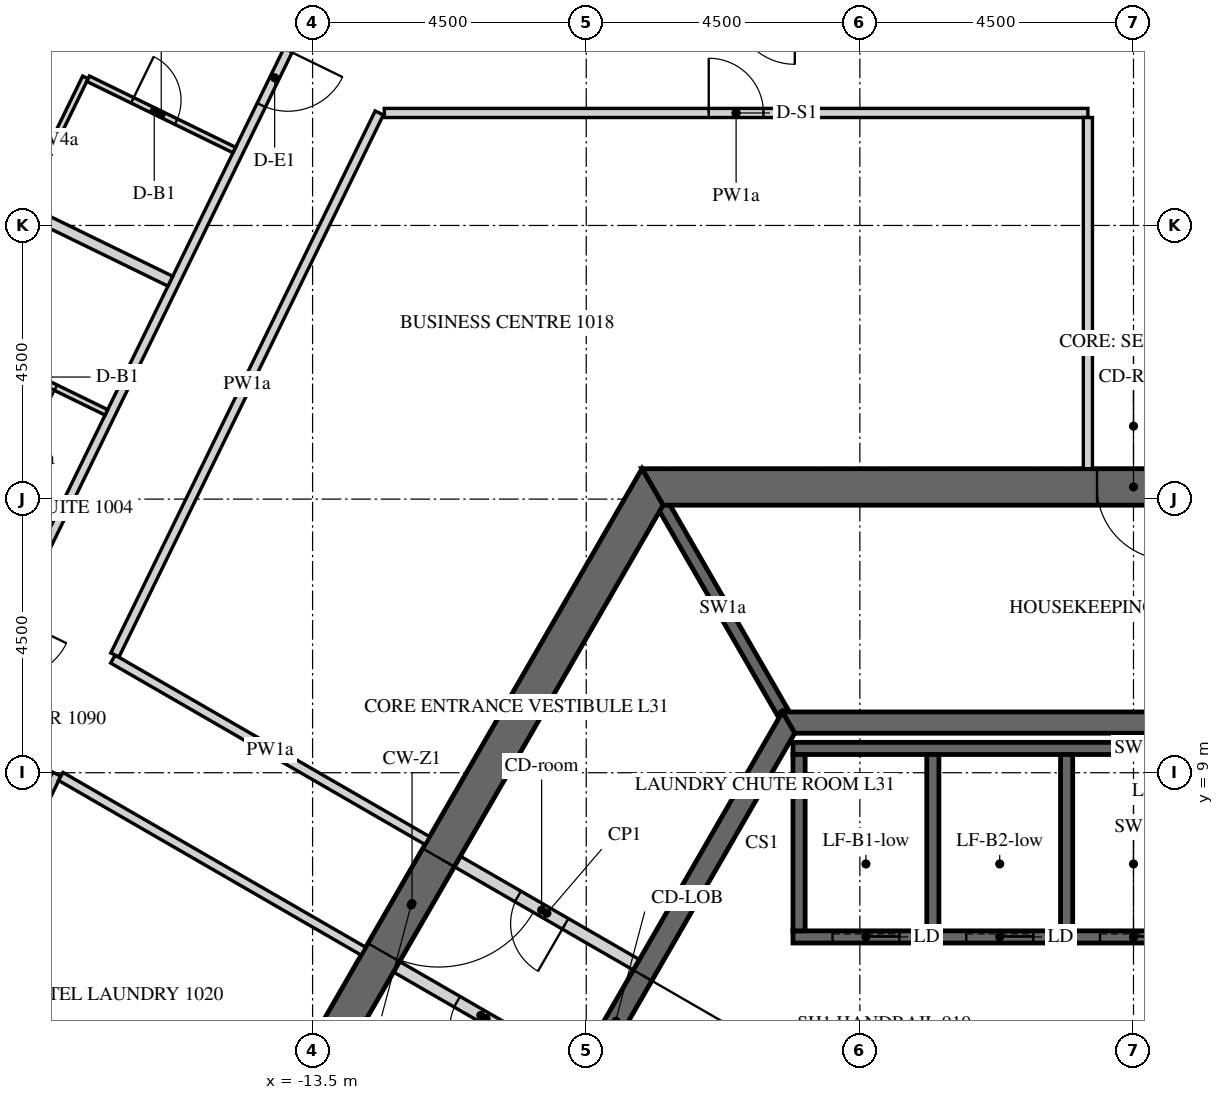
"""IFC4 building model, lengths in metres.
Left out: names, types, materials, properties, quantities, classifications, styles, units other than length and angle.
Written with IfcOpenShell. Run it as: python <this file> out.ifc"""

import sys

from ifc_helpers import new_model, si_unit, direction, frame, frame_2d, origin, place, context, subcontext, project, spatial, polyline, rectangle, outline, extrude, element, fill, save


model = new_model("IFC4")
c1 = context("Model", 3, precision=1e-05, world=origin(), true_north=direction((0.0, 1.0)))
c2 = subcontext(c1, "Body", "Model", "MODEL_VIEW")
j1 = project(units=[si_unit("LENGTHUNIT", "METRE"), si_unit("PLANEANGLEUNIT", "RADIAN")], contexts=[c1])
p1 = place(None, origin())
s1 = spatial("IfcSite", under=j1, at=p1, CompositionType="ELEMENT")
p2 = place(p1, origin())
s2 = spatial("IfcBuilding", under=s1, at=p2, CompositionType="ELEMENT")
p3 = place(p2, frame((0.0, 0.0, 135.0)))
s3 = spatial("IfcBuildingStorey", under=s2, at=p3, CompositionType="ELEMENT", Elevation=135.0)
p4 = place(p3, frame((-7.91, 13.7, -0.15), z_axis=(0.0, 0.0, 1.0), x_axis=(-0.499999880136, -0.866025472988, 0.0)))
e1 = element("IfcWall", 1, at=p4, inside=s3, PredefinedType="SHEAR", context=c2, shape_type="SweptSolid", body=[
    extrude(outline(polyline([(-0.173, -0.3), (15.993, -0.3), (15.646, 0.3), (0.173, 0.3), (-0.173, -0.3)])), origin(), (0.0, 0.0, 1.0), 3.9),
])
p5 = place(p4, frame((7.039, 0.0, 0.15)))
e2 = element("IfcOpeningElement", 2, at=p5, cuts=e1, PredefinedType="OPENING", context=c2, shape_type="SweptSolid", body=[
    extrude(rectangle(XDim=1.8, YDim=2.4, at=frame_2d((0.9, 1.2))), frame((0.0, 0.31, 0.0), z_axis=(0.0, -1.0, 0.0), x_axis=(1.0, 0.0, 0.0)), (0.0, 0.0, 1.0), 0.62),
])
p6 = place(p3, frame((7.91, 13.7, -0.15), z_axis=(0.0, 0.0, 1.0), x_axis=(-1.0, 0.0, 0.0)))
e3 = element("IfcWall", 3, at=p6, inside=s3, PredefinedType="SHEAR", context=c2, shape_type="SweptSolid", body=[
    extrude(outline(polyline([(-0.173, -0.3), (15.993, -0.3), (15.646, 0.3), (0.173, 0.3), (-0.173, -0.3)])), origin(), (0.0, 0.0, 1.0), 3.9),
])
p7 = place(p6, frame((7.31, 0.0, 0.15)))
e4 = element("IfcOpeningElement", 4, at=p7, cuts=e3, PredefinedType="OPENING", context=c2, shape_type="SweptSolid", body=[
    extrude(rectangle(XDim=1.2, YDim=2.4, at=frame_2d((0.6, 1.2))), frame((0.0, 0.31, 0.0), z_axis=(0.0, -1.0, 0.0), x_axis=(1.0, 0.0, 0.0)), (0.0, 0.0, 1.0), 0.62),
])
p8 = place(p3, frame((-5.673, 9.825, -0.15), z_axis=(0.0, 0.0, 1.0), x_axis=(-0.499995046907, -0.866028263435, 0.0)))
e5 = element("IfcWall", 5, at=p8, inside=s3, PredefinedType="SHEAR", context=c2, shape_type="SweptSolid", body=[
    extrude(outline(polyline([(-0.101, -0.175), (11.446, -0.175), (11.244, 0.175), (0.101, 0.175), (-0.101, -0.175)])), origin(), (0.0, 0.0, 1.0), 3.9),
])
p9 = place(p8, frame((4.801, 0.0, 0.15)))
e6 = element("IfcOpeningElement", 6, at=p9, cuts=e5, PredefinedType="OPENING", context=c2, shape_type="SweptSolid", body=[
    extrude(rectangle(XDim=1.8, YDim=2.4, at=frame_2d((0.9, 1.2))), frame((0.0, 0.185, 0.0), z_axis=(0.0, -1.0, 0.0), x_axis=(1.0, 0.0, 0.0)), (0.0, 0.0, 1.0), 0.37),
])
p10 = place(p3, frame((5.673, 9.825, -0.15), z_axis=(0.0, 0.0, 1.0), x_axis=(-1.0, 0.0, 0.0)))
e7 = element("IfcWall", 7, at=p10, inside=s3, PredefinedType="SHEAR", context=c2, shape_type="SweptSolid", body=[
    extrude(outline(polyline([(-0.101, -0.175), (11.446, -0.175), (11.244, 0.175), (0.101, 0.175), (-0.101, -0.175)])), origin(), (0.0, 0.0, 1.0), 3.9),
])
p11 = place(p3, frame((-5.6, 6.3, -0.25), z_axis=(0.0, 0.0, 1.0), x_axis=(1.0, 0.0, 0.0)))
e8 = element("IfcWall", 8, at=p11, inside=s3, PredefinedType="SHEAR", context=c2, shape_type="SweptSolid", body=[
    extrude(rectangle(XDim=11.2, YDim=0.2, at=frame_2d((5.6, 0.0))), origin(), (0.0, 0.0, 1.0), 3.9),
])
p12 = place(p11, frame((0.65, 0.0, 0.25)))
e9 = element("IfcOpeningElement", 9, at=p12, cuts=e8, PredefinedType="OPENING", context=c2, shape_type="SweptSolid", body=[
    extrude(rectangle(XDim=1.1, YDim=2.1, at=frame_2d((0.55, 1.05))), frame((0.0, 0.11, 0.0), z_axis=(0.0, -1.0, 0.0), x_axis=(1.0, 0.0, 0.0)), (0.0, 0.0, 1.0), 0.22),
])
p13 = place(p11, frame((2.85, 0.0, 0.25)))
e10 = element("IfcOpeningElement", 10, at=p13, cuts=e8, PredefinedType="OPENING", context=c2, shape_type="SweptSolid", body=[
    extrude(rectangle(XDim=1.1, YDim=2.1, at=frame_2d((0.55, 1.05))), frame((0.0, 0.11, 0.0), z_axis=(0.0, -1.0, 0.0), x_axis=(1.0, 0.0, 0.0)), (0.0, 0.0, 1.0), 0.22),
])
p14 = place(p11, frame((5.05, 0.0, 0.25)))
e11 = element("IfcOpeningElement", 11, at=p14, cuts=e8, PredefinedType="OPENING", context=c2, shape_type="SweptSolid", body=[
    extrude(rectangle(XDim=1.1, YDim=2.1, at=frame_2d((0.55, 1.05))), frame((0.0, 0.11, 0.0), z_axis=(0.0, -1.0, 0.0), x_axis=(1.0, 0.0, 0.0)), (0.0, 0.0, 1.0), 0.22),
])
p15 = place(p11, frame((7.25, 0.0, 0.25)))
e12 = element("IfcOpeningElement", 12, at=p15, cuts=e8, PredefinedType="OPENING", context=c2, shape_type="SweptSolid", body=[
    extrude(rectangle(XDim=1.1, YDim=2.1, at=frame_2d((0.55, 1.05))), frame((0.0, 0.11, 0.0), z_axis=(0.0, -1.0, 0.0), x_axis=(1.0, 0.0, 0.0)), (0.0, 0.0, 1.0), 0.22),
])
p16 = place(p11, frame((9.45, 0.0, 0.25)))
e13 = element("IfcOpeningElement", 13, at=p16, cuts=e8, PredefinedType="OPENING", context=c2, shape_type="SweptSolid", body=[
    extrude(rectangle(XDim=1.1, YDim=2.1, at=frame_2d((0.55, 1.05))), frame((0.0, 0.11, 0.0), z_axis=(0.0, -1.0, 0.0), x_axis=(1.0, 0.0, 0.0)), (0.0, 0.0, 1.0), 0.22),
])
p17 = place(p3, frame((-5.6, 9.4, -0.25), z_axis=(0.0, 0.0, 1.0), x_axis=(1.0, 0.0, 0.0)))
e14 = element("IfcWall", 14, at=p17, inside=s3, PredefinedType="SHEAR", context=c2, shape_type="SweptSolid", body=[
    extrude(rectangle(XDim=11.2, YDim=0.2, at=frame_2d((5.6, 0.0))), origin(), (0.0, 0.0, 1.0), 3.9),
])
for number, where, z_axis, x_axis in (
    (15, (-5.5, 6.4, -0.25), (0.0, 0.0, 1.0), (0.0, 1.0, 0.0)),
    (16, (-3.3, 6.4, -0.25), (0.0, 0.0, 1.0), (0.0, 1.0, 0.0)),
    (17, (-1.1, 6.4, -0.25), (0.0, 0.0, 1.0), (0.0, 1.0, 0.0)),
):
    element("IfcWall", number, at=place(p3, frame(where, z_axis=z_axis, x_axis=x_axis)), inside=s3, PredefinedType="SHEAR", context=c2, shape_type="SweptSolid", body=[
        extrude(rectangle(XDim=2.9, YDim=0.2, at=frame_2d((1.45, 0.0))), origin(), (0.0, 0.0, 1.0), 3.9),
    ])
p18 = place(p3, frame((-5.773, 10.0, -0.15), z_axis=(0.0, 0.0, 1.0), x_axis=(-0.500038251005, 0.86600331843, 0.0)))
e18 = element("IfcWall", 18, at=p18, inside=s3, PredefinedType="SHEAR", context=c2, shape_type="SweptSolid", body=[
    extrude(rectangle(XDim=3.926, YDim=0.2, at=frame_2d((1.963, 0.0))), origin(), (0.0, 0.0, 1.0), 3.9),
])
p19 = place(p3, frame((-9.175, 4.109, 0.0), z_axis=(0.0, 0.0, 1.0), x_axis=(-0.865989465428, 0.500062241894, 0.0)))
e19 = element("IfcWall", 19, at=p19, inside=s3, PredefinedType="PARTITIONING", context=c2, shape_type="SweptSolid", body=[
    extrude(rectangle(XDim=3.4, YDim=0.2, at=frame_2d((1.7, 0.0))), origin(), (0.0, 0.0, 1.0), 3.65),
])
p20 = place(p19, frame((1.351, 0.0, 0.0)))
e20 = element("IfcOpeningElement", 20, at=p20, cuts=e19, PredefinedType="OPENING", context=c2, shape_type="SweptSolid", body=[
    extrude(rectangle(XDim=0.9, YDim=2.1, at=frame_2d((0.45, 1.05))), frame((0.0, 0.11, 0.0), z_axis=(0.0, -1.0, 0.0), x_axis=(1.0, 0.0, 0.0)), (0.0, 0.0, 1.0), 0.22),
])
p21 = place(p3, frame((-8.175, 5.841, 0.0), z_axis=(0.0, 0.0, 1.0), x_axis=(-0.866020560687, 0.500008388397, 0.0)))
e21 = element("IfcWall", 21, at=p21, inside=s3, PredefinedType="PARTITIONING", context=c2, shape_type="SweptSolid", body=[
    extrude(rectangle(XDim=3.4, YDim=0.2, at=frame_2d((1.7, 0.0))), origin(), (0.0, 0.0, 1.0), 3.65),
])
p22 = place(p21, frame((1.35, 0.0, 0.0)))
e22 = element("IfcOpeningElement", 22, at=p22, cuts=e21, PredefinedType="OPENING", context=c2, shape_type="SweptSolid", body=[
    extrude(rectangle(XDim=0.9, YDim=2.1, at=frame_2d((0.45, 1.05))), frame((0.0, 0.11, 0.0), z_axis=(0.0, -1.0, 0.0), x_axis=(1.0, 0.0, 0.0)), (0.0, 0.0, 1.0), 0.22),
])
p23 = place(p3, frame((-13.565, 21.575, 0.0), z_axis=(0.0, 0.0, 1.0), x_axis=(-0.438378393111, -0.898790511996, 0.0)))
e23 = element("IfcWall", 23, at=p23, inside=s3, PredefinedType="PARTITIONING", context=c2, shape_type="SweptSolid", body=[
    extrude(rectangle(XDim=21.584, YDim=0.15, at=frame_2d((10.792, 0.0))), origin(), (0.0, 0.0, 1.0), 2.838),
])
p24 = place(p23, frame((0.775, 0.0, 0.0)))
e24 = element("IfcOpeningElement", 24, at=p24, cuts=e23, PredefinedType="OPENING", context=c2, shape_type="SweptSolid", body=[
    extrude(rectangle(XDim=1.0, YDim=2.1, at=frame_2d((0.5, 1.05))), frame((0.0, 0.085, 0.0), z_axis=(0.0, -1.0, 0.0), x_axis=(1.0, 0.0, 0.0)), (0.0, 0.0, 1.0), 0.17),
])
p25 = place(p23, frame((11.134, 0.0, 0.0)))
e25 = element("IfcOpeningElement", 25, at=p25, cuts=e23, PredefinedType="OPENING", context=c2, shape_type="SweptSolid", body=[
    extrude(rectangle(XDim=1.0, YDim=2.1, at=frame_2d((0.5, 1.05))), frame((0.0, 0.085, 0.0), z_axis=(0.0, -1.0, 0.0), x_axis=(1.0, 0.0, 0.0)), (0.0, 0.0, 1.0), 0.17),
])
p26 = place(p23, frame((16.801, 0.0, 0.0)))
e26 = element("IfcOpeningElement", 26, at=p26, cuts=e23, PredefinedType="OPENING", context=c2, shape_type="SweptSolid", body=[
    extrude(rectangle(XDim=1.0, YDim=2.1, at=frame_2d((0.5, 1.05))), frame((0.0, 0.085, 0.0), z_axis=(0.0, -1.0, 0.0), x_axis=(1.0, 0.0, 0.0)), (0.0, 0.0, 1.0), 0.17),
])
p27 = place(p3, frame((-11.614, 7.884, 0.0), z_axis=(0.0, 0.0, 1.0), x_axis=(-0.866017375886, 0.50001390447, 0.0)))
e27 = element("IfcWall", 27, at=p27, inside=s3, PredefinedType="PARTITIONING", context=c2, shape_type="SweptSolid", body=[
    extrude(rectangle(XDim=5.97, YDim=0.15, at=frame_2d((2.985, 0.0))), origin(), (0.0, 0.0, 1.0), 2.838),
])
p28 = place(p3, frame((-16.751, 10.937, 0.0), z_axis=(0.0, 0.0, 1.0), x_axis=(0.438378523504, 0.898790448397, 0.0)))
e28 = element("IfcWall", 28, at=p28, inside=s3, PredefinedType="PARTITIONING", context=c2, shape_type="SweptSolid", body=[
    extrude(rectangle(XDim=9.917, YDim=0.15, at=frame_2d((4.958, 0.0))), origin(), (0.0, 0.0, 1.0), 2.838),
])
p29 = place(p3, frame((-12.32, 19.85, 0.0), z_axis=(0.0, 0.0, 1.0), x_axis=(1.0, 0.0, 0.0)))
e29 = element("IfcWall", 29, at=p29, inside=s3, PredefinedType="PARTITIONING", context=c2, shape_type="SweptSolid", body=[
    extrude(rectangle(XDim=11.57, YDim=0.15, at=frame_2d((5.785, 0.0))), origin(), (0.0, 0.0, 1.0), 2.838),
])
p30 = place(p29, frame((5.335, 0.0, 0.0)))
e30 = element("IfcOpeningElement", 30, at=p30, cuts=e29, PredefinedType="OPENING", context=c2, shape_type="SweptSolid", body=[
    extrude(rectangle(XDim=0.9, YDim=2.1, at=frame_2d((0.45, 1.05))), frame((0.0, 0.085, 0.0), z_axis=(0.0, -1.0, 0.0), x_axis=(1.0, 0.0, 0.0)), (0.0, 0.0, 1.0), 0.17),
])
p31 = place(p3, frame((-0.75, 19.775, 0.0), z_axis=(0.0, 0.0, 1.0), x_axis=(0.0, -1.0, 0.0)))
e31 = element("IfcWall", 31, at=p31, inside=s3, PredefinedType="PARTITIONING", context=c2, shape_type="SweptSolid", body=[
    extrude(rectangle(XDim=5.775, YDim=0.15, at=frame_2d((2.887, 0.0))), origin(), (0.0, 0.0, 1.0), 2.838),
])
p32 = place(p3, frame((-21.885, 0.41, 0.0), z_axis=(0.0, 0.0, 1.0), x_axis=(0.43837064471, 0.898794291179, 0.0)))
e32 = element("IfcWall", 32, at=p32, inside=s3, PredefinedType="PARTITIONING", context=c2, shape_type="SweptSolid", body=[
    extrude(rectangle(XDim=9.532, YDim=0.15, at=frame_2d((4.766, 0.0))), origin(), (0.0, 0.0, 1.0), 2.838),
])
p33 = place(p32, frame((4.316, 0.0, 0.0)))
e33 = element("IfcOpeningElement", 33, at=p33, cuts=e32, PredefinedType="OPENING", context=c2, shape_type="SweptSolid", body=[
    extrude(rectangle(XDim=0.9, YDim=2.1, at=frame_2d((0.45, 1.05))), frame((0.0, 0.085, 0.0), z_axis=(0.0, -1.0, 0.0), x_axis=(1.0, 0.0, 0.0)), (0.0, 0.0, 1.0), 0.17),
])
p34 = place(p3, frame((-17.642, 8.94, 0.0), z_axis=(0.0, 0.0, 1.0), x_axis=(0.866017948234, -0.500012913169, 0.0)))
e34 = element("IfcWall", 34, at=p34, inside=s3, PredefinedType="PARTITIONING", context=c2, shape_type="SweptSolid", body=[
    extrude(rectangle(XDim=5.748, YDim=0.15, at=frame_2d((2.874, 0.0))), origin(), (0.0, 0.0, 1.0), 2.838),
])
p35 = place(p3, frame((-18.249, 18.359, 0.0), z_axis=(0.0, 0.0, 1.0), x_axis=(0.438313261974, 0.898822276303, 0.0)))
e35 = element("IfcWall", 35, at=p35, inside=s3, PredefinedType="PARTITIONING", context=c2, shape_type="SweptSolid", body=[
    extrude(rectangle(XDim=2.31, YDim=0.1, at=frame_2d((1.155, 0.0))), origin(), (0.0, 0.0, 1.0), 2.838),
])
p36 = place(p3, frame((-17.191, 20.413, 0.0), z_axis=(0.0, 0.0, 1.0), x_axis=(0.898800897694, -0.438357099068, 0.0)))
e36 = element("IfcWall", 36, at=p36, inside=s3, PredefinedType="PARTITIONING", context=c2, shape_type="SweptSolid", body=[
    extrude(rectangle(XDim=2.675, YDim=0.1, at=frame_2d((1.337, 0.0))), origin(), (0.0, 0.0, 1.0), 2.838),
])
p37 = place(p36, frame((0.81, 0.0, 0.0)))
e37 = element("IfcOpeningElement", 37, at=p37, cuts=e36, PredefinedType="OPENING", context=c2, shape_type="SweptSolid", body=[
    extrude(rectangle(XDim=0.8, YDim=2.1, at=frame_2d((0.4, 1.05))), frame((0.0, 0.06, 0.0), z_axis=(0.0, -1.0, 0.0), x_axis=(1.0, 0.0, 0.0)), (0.0, 0.0, 1.0), 0.12),
])
p38 = place(p3, frame((-22.782, 20.47, 0.0), z_axis=(0.0, 0.0, 1.0), x_axis=(0.898789402655, -0.438380667542, 0.0)))
e38 = element("IfcWall", 38, at=p38, inside=s3, PredefinedType="PARTITIONING", context=c2, shape_type="SweptSolid", body=[
    extrude(rectangle(XDim=7.725, YDim=0.18, at=frame_2d((3.862, 0.0))), origin(), (0.0, 0.0, 1.0), 2.838),
])
p39 = place(p3, frame((-16.891, 14.926, 0.0), z_axis=(0.0, 0.0, 1.0), x_axis=(-0.898791692788, 0.43837597217, 0.0)))
e39 = element("IfcWall", 39, at=p39, inside=s3, PredefinedType="PARTITIONING", context=c2, shape_type="SweptSolid", body=[
    extrude(rectangle(XDim=2.725, YDim=0.1, at=frame_2d((1.363, 0.0))), origin(), (0.0, 0.0, 1.0), 2.838),
])
p40 = place(p39, frame((0.925, 0.0, 0.0)))
e40 = element("IfcOpeningElement", 40, at=p40, cuts=e39, PredefinedType="OPENING", context=c2, shape_type="SweptSolid", body=[
    extrude(rectangle(XDim=0.8, YDim=2.1, at=frame_2d((0.4, 1.05))), frame((0.0, 0.06, 0.0), z_axis=(0.0, -1.0, 0.0), x_axis=(1.0, 0.0, 0.0)), (0.0, 0.0, 1.0), 0.12),
])
p41 = place(p5, origin())
e41 = element("IfcDoor", 41, at=p41, inside=s3, OperationType="DOUBLE_DOOR_SINGLE_SWING", PredefinedType="DOOR", context=c2, shape_type="SweptSolid", body=[
    extrude(rectangle(XDim=1.8, YDim=2.4, at=frame_2d((0.9, 1.2))), frame((0.0, 0.025, 0.0), z_axis=(0.0, -1.0, 0.0), x_axis=(1.0, 0.0, 0.0)), (0.0, 0.0, 1.0), 0.05),
])
fill(e2, e41)
p42 = place(p7, origin())
e42 = element("IfcDoor", 42, at=p42, inside=s3, OperationType="SINGLE_SWING_LEFT", PredefinedType="DOOR", context=c2, shape_type="SweptSolid", body=[
    extrude(rectangle(XDim=1.2, YDim=2.4, at=frame_2d((0.6, 1.2))), frame((0.0, 0.025, 0.0), z_axis=(0.0, -1.0, 0.0), x_axis=(1.0, 0.0, 0.0)), (0.0, 0.0, 1.0), 0.05),
])
fill(e4, e42)
p43 = place(p9, origin())
e43 = element("IfcDoor", 43, at=p43, inside=s3, OperationType="DOUBLE_DOOR_SINGLE_SWING", PredefinedType="DOOR", context=c2, shape_type="SweptSolid", body=[
    extrude(rectangle(XDim=1.8, YDim=2.4, at=frame_2d((0.9, 1.2))), frame((0.0, 0.025, 0.0), z_axis=(0.0, -1.0, 0.0), x_axis=(1.0, 0.0, 0.0)), (0.0, 0.0, 1.0), 0.05),
])
fill(e6, e43)
p44 = place(p20, origin())
e44 = element("IfcDoor", 44, at=p44, inside=s3, OperationType="SINGLE_SWING_LEFT", PredefinedType="DOOR", context=c2, shape_type="SweptSolid", body=[
    extrude(rectangle(XDim=0.9, YDim=2.1, at=frame_2d((0.45, 1.05))), frame((0.0, 0.025, 0.0), z_axis=(0.0, -1.0, 0.0), x_axis=(1.0, 0.0, 0.0)), (0.0, 0.0, 1.0), 0.05),
])
fill(e20, e44)
p45 = place(p22, origin())
e45 = element("IfcDoor", 45, at=p45, inside=s3, OperationType="SINGLE_SWING_LEFT", PredefinedType="DOOR", context=c2, shape_type="SweptSolid", body=[
    extrude(rectangle(XDim=0.9, YDim=2.1, at=frame_2d((0.45, 1.05))), frame((0.0, 0.025, 0.0), z_axis=(0.0, -1.0, 0.0), x_axis=(1.0, 0.0, 0.0)), (0.0, 0.0, 1.0), 0.05),
])
fill(e22, e45)
p46 = place(p12, origin())
e46 = element("IfcDoor", 46, at=p46, inside=s3, OperationType="SLIDING_TO_LEFT", PredefinedType="DOOR", context=c2, shape_type="SweptSolid", body=[
    extrude(rectangle(XDim=1.1, YDim=2.1, at=frame_2d((0.55, 1.05))), frame((0.0, 0.025, 0.0), z_axis=(0.0, -1.0, 0.0), x_axis=(1.0, 0.0, 0.0)), (0.0, 0.0, 1.0), 0.05),
])
fill(e9, e46)
p47 = place(p13, origin())
e47 = element("IfcDoor", 47, at=p47, inside=s3, OperationType="SLIDING_TO_LEFT", PredefinedType="DOOR", context=c2, shape_type="SweptSolid", body=[
    extrude(rectangle(XDim=1.1, YDim=2.1, at=frame_2d((0.55, 1.05))), frame((0.0, 0.025, 0.0), z_axis=(0.0, -1.0, 0.0), x_axis=(1.0, 0.0, 0.0)), (0.0, 0.0, 1.0), 0.05),
])
fill(e10, e47)
p48 = place(p14, origin())
e48 = element("IfcDoor", 48, at=p48, inside=s3, OperationType="SLIDING_TO_LEFT", PredefinedType="DOOR", context=c2, shape_type="SweptSolid", body=[
    extrude(rectangle(XDim=1.1, YDim=2.1, at=frame_2d((0.55, 1.05))), frame((0.0, 0.025, 0.0), z_axis=(0.0, -1.0, 0.0), x_axis=(1.0, 0.0, 0.0)), (0.0, 0.0, 1.0), 0.05),
])
fill(e11, e48)
p49 = place(p24, origin())
e49 = element("IfcDoor", 49, at=p49, inside=s3, OperationType="SINGLE_SWING_RIGHT", PredefinedType="DOOR", context=c2, shape_type="SweptSolid", body=[
    extrude(rectangle(XDim=1.0, YDim=2.1, at=frame_2d((0.5, 1.05))), frame((0.0, 0.025, 0.0), z_axis=(0.0, -1.0, 0.0), x_axis=(1.0, 0.0, 0.0)), (0.0, 0.0, 1.0), 0.05),
])
fill(e24, e49)
p50 = place(p37, origin())
e50 = element("IfcDoor", 50, at=p50, inside=s3, OperationType="SINGLE_SWING_RIGHT", PredefinedType="DOOR", context=c2, shape_type="SweptSolid", body=[
    extrude(rectangle(XDim=0.8, YDim=2.1, at=frame_2d((0.4, 1.05))), frame((0.0, 0.025, 0.0), z_axis=(0.0, -1.0, 0.0), x_axis=(1.0, 0.0, 0.0)), (0.0, 0.0, 1.0), 0.05),
])
fill(e37, e50)
p51 = place(p40, origin())
e51 = element("IfcDoor", 51, at=p51, inside=s3, OperationType="SINGLE_SWING_RIGHT", PredefinedType="DOOR", context=c2, shape_type="SweptSolid", body=[
    extrude(rectangle(XDim=0.8, YDim=2.1, at=frame_2d((0.4, 1.05))), frame((0.0, 0.025, 0.0), z_axis=(0.0, -1.0, 0.0), x_axis=(1.0, 0.0, 0.0)), (0.0, 0.0, 1.0), 0.05),
])
fill(e40, e51)
p52 = place(p30, origin())
e52 = element("IfcDoor", 52, at=p52, inside=s3, OperationType="SINGLE_SWING_RIGHT", PredefinedType="DOOR", context=c2, shape_type="SweptSolid", body=[
    extrude(rectangle(XDim=0.9, YDim=2.1, at=frame_2d((0.45, 1.05))), frame((0.0, 0.025, 0.0), z_axis=(0.0, -1.0, 0.0), x_axis=(1.0, 0.0, 0.0)), (0.0, 0.0, 1.0), 0.05),
])
fill(e30, e52)
save(model, sys.argv[1])
